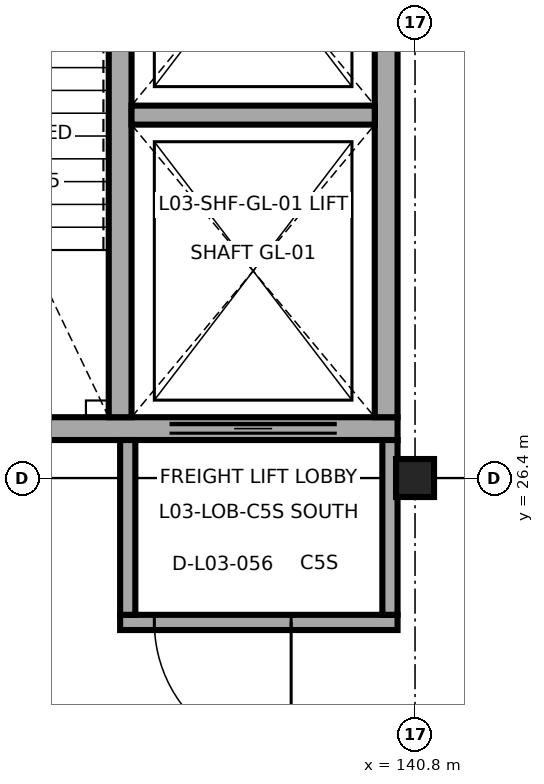
"""IFC4 building model, lengths in metres.
Left out: names, types, materials, properties, quantities, classifications, styles, units other than length and angle.
Written with IfcOpenShell. Run it as: python <this file> out.ifc"""

import sys

from ifc_helpers import new_model, si_unit, direction, frame, frame_2d, origin, origin_2d, place, context, subcontext, project, spatial, rectangle, extrude, element, fill, save


model = new_model("IFC4")
c1 = context("Model", 3, precision=1e-05, world=origin(), true_north=direction((0.0, 1.0)))
c2 = subcontext(c1, "Body", "Model", "MODEL_VIEW")
j1 = project(units=[si_unit("LENGTHUNIT", "METRE"), si_unit("PLANEANGLEUNIT", "RADIAN")], contexts=[c1])
p1 = place(None, origin())
s1 = spatial("IfcSite", under=j1, at=p1, CompositionType="ELEMENT")
p2 = place(p1, origin())
s2 = spatial("IfcBuilding", under=s1, at=p2, CompositionType="ELEMENT")
p3 = place(p2, frame((0.0, 0.0, 17.4)))
s3 = spatial("IfcBuildingStorey", under=s2, at=p3, CompositionType="ELEMENT", Elevation=17.4)
p4 = place(p3, frame((140.8, 26.4, 0.0), z_axis=(0.0, 0.0, 1.0), x_axis=(1.0, 0.0, 0.0)))
e1 = element("IfcColumn", 1, at=p4, inside=s3, PredefinedType="COLUMN", context=c2, shape_type="SweptSolid", body=[
    extrude(rectangle(XDim=0.5, YDim=0.5, at=origin_2d()), origin(), (0.0, 0.0, 1.0), 4.5),
])
p5 = place(p3, frame((132.63, 27.05, 0.0), z_axis=(0.0, 0.0, 1.0), x_axis=(1.0, 0.0, 0.0)))
e2 = element("IfcWall", 2, at=p5, inside=s3, PredefinedType="SHEAR", context=c2, shape_type="SweptSolid", body=[
    extrude(rectangle(XDim=7.94, YDim=0.3, at=frame_2d((3.97, 0.0))), origin(), (0.0, 0.0, 1.0), 4.25),
])
p6 = place(p5, frame((4.94, 0.0, 0.0)))
e3 = element("IfcOpeningElement", 3, at=p6, cuts=e2, PredefinedType="OPENING", context=c2, shape_type="SweptSolid", body=[
    extrude(rectangle(XDim=2.2, YDim=2.6, at=frame_2d((1.1, 1.3))), frame((0.0, 0.16, 0.0), z_axis=(0.0, -1.0, 0.0), x_axis=(1.0, 0.0, 0.0)), (0.0, 0.0, 1.0), 0.32),
])
for number, where, z_axis, x_axis in (
    (4, (140.42, 27.2, 0.0), (0.0, 0.0, 1.0), (0.0, 1.0, 0.0)),
    (5, (136.92, 27.2, 0.0), (0.0, 0.0, 1.0), (0.0, 1.0, 0.0)),
):
    element("IfcWall", number, at=place(p3, frame(where, z_axis=z_axis, x_axis=x_axis)), inside=s3, PredefinedType="SHEAR", context=c2, shape_type="SweptSolid", body=[
        extrude(rectangle(XDim=8.0, YDim=0.3, at=frame_2d((4.0, 0.0))), origin(), (0.0, 0.0, 1.0), 4.25),
    ])
p7 = place(p3, frame((137.07, 31.175, 0.0), z_axis=(0.0, 0.0, 1.0), x_axis=(1.0, 0.0, 0.0)))
e6 = element("IfcWall", 6, at=p7, inside=s3, PredefinedType="SHEAR", context=c2, shape_type="SweptSolid", body=[
    extrude(rectangle(XDim=3.2, YDim=0.25, at=frame_2d((1.6, 0.0))), origin(), (0.0, 0.0, 1.0), 4.25),
])
p8 = place(p3, frame((140.57, 24.5, 0.0), z_axis=(0.0, 0.0, 1.0), x_axis=(-1.0, 0.0, 0.0)))
e7 = element("IfcWall", 7, at=p8, inside=s3, PredefinedType="SOLIDWALL", context=c2, shape_type="SweptSolid", body=[
    extrude(rectangle(XDim=3.65, YDim=0.2, at=frame_2d((1.825, 0.0))), origin(), (0.0, 0.0, 1.0), 4.235),
])
p9 = place(p8, frame((1.4, 0.0, 0.0)))
e8 = element("IfcOpeningElement", 8, at=p9, cuts=e7, PredefinedType="OPENING", context=c2, shape_type="SweptSolid", body=[
    extrude(rectangle(XDim=1.8, YDim=2.2, at=frame_2d((0.9, 1.1))), frame((0.0, 0.11, 0.0), z_axis=(0.0, -1.0, 0.0), x_axis=(1.0, 0.0, 0.0)), (0.0, 0.0, 1.0), 0.22),
])
for number, where, z_axis, x_axis in (
    (9, (137.02, 24.6, 0.0), (0.0, 0.0, 1.0), (0.0, 1.0, 0.0)),
    (10, (140.47, 26.9, 0.0), (0.0, 0.0, 1.0), (0.0, -1.0, 0.0)),
):
    element("IfcWall", number, at=place(p3, frame(where, z_axis=z_axis, x_axis=x_axis)), inside=s3, PredefinedType="SOLIDWALL", context=c2, shape_type="SweptSolid", body=[
        extrude(rectangle(XDim=2.3, YDim=0.2, at=frame_2d((1.15, 0.0))), origin(), (0.0, 0.0, 1.0), 3.682),
    ])
p10 = place(p6, origin())
e11 = element("IfcDoor", 11, at=p10, inside=s3, OperationType="SLIDING_TO_LEFT", PredefinedType="DOOR", context=c2, shape_type="SweptSolid", body=[
    extrude(rectangle(XDim=2.2, YDim=2.6, at=frame_2d((1.1, 1.3))), frame((0.0, 0.025, 0.0), z_axis=(0.0, -1.0, 0.0), x_axis=(1.0, 0.0, 0.0)), (0.0, 0.0, 1.0), 0.05),
])
fill(e3, e11)
p11 = place(p9, origin())
e12 = element("IfcDoor", 12, at=p11, inside=s3, OperationType="DOUBLE_DOOR_SINGLE_SWING", PredefinedType="DOOR", context=c2, shape_type="SweptSolid", body=[
    extrude(rectangle(XDim=1.8, YDim=2.2, at=frame_2d((0.9, 1.1))), frame((0.0, 0.025, 0.0), z_axis=(0.0, -1.0, 0.0), x_axis=(1.0, 0.0, 0.0)), (0.0, 0.0, 1.0), 0.05),
])
fill(e8, e12)
save(model, sys.argv[1])
